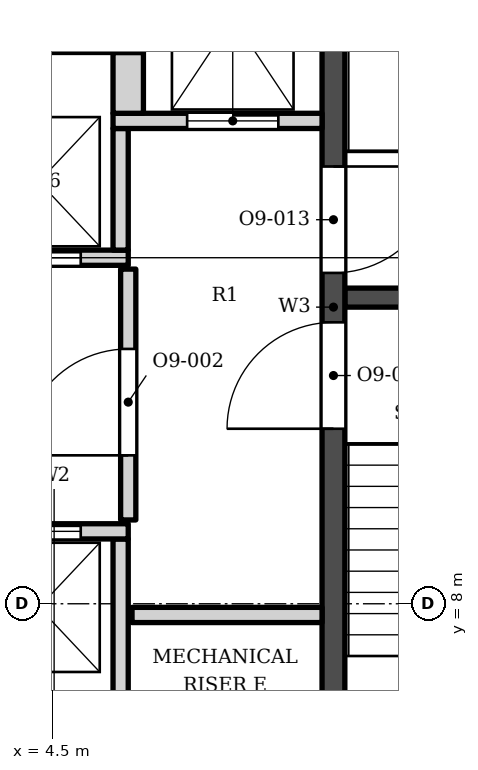
"""IFC4 building model, lengths in metres.
Left out: names, types, materials, properties, quantities, classifications, styles, units other than length and angle.
Written with IfcOpenShell. Run it as: python <this file> out.ifc"""

import sys

from ifc_helpers import new_model, si_unit, direction, frame, frame_2d, origin, place, context, subcontext, project, spatial, rectangle, extrude, element, fill, save


model = new_model("IFC4")
c1 = context("Model", 3, precision=1e-05, world=origin(), true_north=direction((0.0, 1.0)))
c2 = subcontext(c1, "Body", "Model", "MODEL_VIEW")
j1 = project(units=[si_unit("LENGTHUNIT", "METRE"), si_unit("PLANEANGLEUNIT", "RADIAN")], contexts=[c1])
p1 = place(None, origin())
s1 = spatial("IfcSite", under=j1, at=p1, CompositionType="ELEMENT")
p2 = place(p1, origin())
s2 = spatial("IfcBuilding", under=s1, at=p2, CompositionType="ELEMENT")
p3 = place(p2, frame((0.0, 0.0, 248.2)))
s3 = spatial("IfcBuildingStorey", under=s2, at=p3, CompositionType="ELEMENT", Elevation=248.2)
p4 = place(p3, frame((8.2, 5.253, 0.0), z_axis=(0.0, 0.0, 1.0), x_axis=(0.0, 1.0, 0.0)))
e1 = element("IfcWall", 1, at=p4, inside=s3, PredefinedType="SHEAR", context=c2, shape_type="SweptSolid", body=[
    extrude(rectangle(XDim=13.3, YDim=0.3, at=frame_2d((6.65, 0.0))), origin(), (0.0, 0.0, 1.0), 3.9),
])
p5 = place(p4, frame((7.1, 0.0, 0.0)))
e2 = element("IfcOpeningElement", 2, at=p5, cuts=e1, PredefinedType="OPENING", context=c2, shape_type="SweptSolid", body=[
    extrude(rectangle(XDim=1.4, YDim=2.1, at=frame_2d((0.7, 1.05))), frame((0.0, 0.16, 0.0), z_axis=(0.0, -1.0, 0.0), x_axis=(1.0, 0.0, 0.0)), (0.0, 0.0, 1.0), 0.32),
])
p6 = place(p4, frame((5.05, 0.0, 0.0)))
e3 = element("IfcOpeningElement", 3, at=p6, cuts=e1, PredefinedType="OPENING", context=c2, shape_type="SweptSolid", body=[
    extrude(rectangle(XDim=1.4, YDim=2.1, at=frame_2d((0.7, 1.05))), frame((0.0, 0.16, 0.0), z_axis=(0.0, -1.0, 0.0), x_axis=(1.0, 0.0, 0.0)), (0.0, 0.0, 1.0), 0.32),
])
p7 = place(p3, frame((8.35, 12.028, 0.0), z_axis=(0.0, 0.0, 1.0), x_axis=(1.0, 0.0, 0.0)))
e4 = element("IfcWall", 4, at=p7, inside=s3, PredefinedType="SHEAR", context=c2, shape_type="SweptSolid", body=[
    extrude(rectangle(XDim=3.75, YDim=0.25, at=frame_2d((1.875, 0.0))), origin(), (0.0, 0.0, 1.0), 3.9),
])
for number, where, z_axis, x_axis in (
    (5, (5.4, 6.353, 0.0), (0.0, 0.0, 1.0), (0.0, 1.0, 0.0)),
    (6, (5.55, 7.853, 0.0), (0.0, 0.0, 1.0), (1.0, 0.0, 0.0)),
):
    element("IfcWall", number, at=place(p3, frame(where, z_axis=z_axis, x_axis=x_axis)), inside=s3, PredefinedType="SOLIDWALL", context=c2, shape_type="SweptSolid", body=[
        extrude(rectangle(XDim=2.5, YDim=0.2, at=frame_2d((1.25, 0.0))), origin(), (0.0, 0.0, 1.0), 3.73),
    ])
p8 = place(p3, frame((1.0, 8.953, 0.0), z_axis=(0.0, 0.0, 1.0), x_axis=(1.0, 0.0, 0.0)))
e7 = element("IfcWall", 7, at=p8, inside=s3, PredefinedType="SOLIDWALL", context=c2, shape_type="SweptSolid", body=[
    extrude(rectangle(XDim=4.5, YDim=0.2, at=frame_2d((2.25, 0.0))), origin(), (0.0, 0.0, 1.0), 3.73),
])
p9 = place(p8, frame((0.625, 0.0, 0.0)))
e8 = element("IfcOpeningElement", 8, at=p9, cuts=e7, PredefinedType="OPENING", context=c2, shape_type="SweptSolid", body=[
    extrude(rectangle(XDim=1.1, YDim=2.1, at=frame_2d((0.55, 1.05))), frame((0.0, 0.11, 0.0), z_axis=(0.0, -1.0, 0.0), x_axis=(1.0, 0.0, 0.0)), (0.0, 0.0, 1.0), 0.22),
])
p10 = place(p8, frame((2.775, 0.0, 0.0)))
e9 = element("IfcOpeningElement", 9, at=p10, cuts=e7, PredefinedType="OPENING", context=c2, shape_type="SweptSolid", body=[
    extrude(rectangle(XDim=1.1, YDim=2.1, at=frame_2d((0.55, 1.05))), frame((0.0, 0.11, 0.0), z_axis=(0.0, -1.0, 0.0), x_axis=(1.0, 0.0, 0.0)), (0.0, 0.0, 1.0), 0.22),
])
p11 = place(p3, frame((5.5, 9.103, 0.0), z_axis=(0.0, 0.0, 1.0), x_axis=(0.0, 1.0, 0.0)))
e10 = element("IfcWall", 10, at=p11, inside=s3, PredefinedType="SOLIDWALL", context=c2, shape_type="SweptSolid", body=[
    extrude(rectangle(XDim=3.3, YDim=0.2, at=frame_2d((1.65, 0.0))), origin(), (0.0, 0.0, 1.0), 3.73),
])
p12 = place(p11, frame((0.85, 0.0, 0.0)))
e11 = element("IfcOpeningElement", 11, at=p12, cuts=e10, PredefinedType="OPENING", context=c2, shape_type="SweptSolid", body=[
    extrude(rectangle(XDim=1.4, YDim=2.1, at=frame_2d((0.7, 1.05))), frame((0.0, 0.11, 0.0), z_axis=(0.0, -1.0, 0.0), x_axis=(1.0, 0.0, 0.0)), (0.0, 0.0, 1.0), 0.22),
])
p13 = place(p3, frame((-1.5, 12.552, 0.0), z_axis=(0.0, 0.0, 1.0), x_axis=(1.0, 0.0, 0.0)))
e12 = element("IfcWall", 12, at=p13, inside=s3, PredefinedType="SOLIDWALL", context=c2, shape_type="SweptSolid", body=[
    extrude(rectangle(XDim=7.0, YDim=0.2, at=frame_2d((3.5, 0.0))), origin(), (0.0, 0.0, 1.0), 3.73),
])
p14 = place(p13, frame((3.075, 0.0, 0.0)))
e13 = element("IfcOpeningElement", 13, at=p14, cuts=e12, PredefinedType="OPENING", context=c2, shape_type="SweptSolid", body=[
    extrude(rectangle(XDim=1.1, YDim=2.1, at=frame_2d((0.55, 1.05))), frame((0.0, 0.11, 0.0), z_axis=(0.0, -1.0, 0.0), x_axis=(1.0, 0.0, 0.0)), (0.0, 0.0, 1.0), 0.22),
])
p15 = place(p13, frame((5.275, 0.0, 0.0)))
e14 = element("IfcOpeningElement", 14, at=p15, cuts=e12, PredefinedType="OPENING", context=c2, shape_type="SweptSolid", body=[
    extrude(rectangle(XDim=1.1, YDim=2.1, at=frame_2d((0.55, 1.05))), frame((0.0, 0.11, 0.0), z_axis=(0.0, -1.0, 0.0), x_axis=(1.0, 0.0, 0.0)), (0.0, 0.0, 1.0), 0.22),
])
p16 = place(p3, frame((5.4, 12.653, 0.0), z_axis=(0.0, 0.0, 1.0), x_axis=(0.0, 1.0, 0.0)))
e15 = element("IfcWall", 15, at=p16, inside=s3, PredefinedType="SOLIDWALL", context=c2, shape_type="SweptSolid", body=[
    extrude(rectangle(XDim=1.6, YDim=0.2, at=frame_2d((0.8, 0.0))), origin(), (0.0, 0.0, 1.0), 3.73),
])
p17 = place(p3, frame((5.3, 14.353, 0.0), z_axis=(0.0, 0.0, 1.0), x_axis=(1.0, 0.0, 0.0)))
e16 = element("IfcWall", 16, at=p17, inside=s3, PredefinedType="SOLIDWALL", context=c2, shape_type="SweptSolid", body=[
    extrude(rectangle(XDim=2.75, YDim=0.2, at=frame_2d((1.375, 0.0))), origin(), (0.0, 0.0, 1.0), 3.73),
])
p18 = place(p17, frame((0.975, 0.0, 0.0)))
e17 = element("IfcOpeningElement", 17, at=p18, cuts=e16, PredefinedType="OPENING", context=c2, shape_type="SweptSolid", body=[
    extrude(rectangle(XDim=1.2, YDim=2.1, at=frame_2d((0.6, 1.05))), frame((0.0, 0.11, 0.0), z_axis=(0.0, -1.0, 0.0), x_axis=(1.0, 0.0, 0.0)), (0.0, 0.0, 1.0), 0.22),
])
p19 = place(p3, frame((5.5, 14.453, 0.0), z_axis=(0.0, 0.0, 1.0), x_axis=(0.0, 1.0, 0.0)))
e18 = element("IfcWall", 18, at=p19, inside=s3, PredefinedType="SOLIDWALL", context=c2, shape_type="SweptSolid", body=[
    extrude(rectangle(XDim=0.8, YDim=0.4, at=frame_2d((0.4, 0.0))), origin(), (0.0, 0.0, 1.0), 3.73),
])
p20 = place(p3, frame((-1.5, 15.353, 0.0), z_axis=(0.0, 0.0, 1.0), x_axis=(1.0, 0.0, 0.0)))
e19 = element("IfcWall", 19, at=p20, inside=s3, PredefinedType="SOLIDWALL", context=c2, shape_type="SweptSolid", body=[
    extrude(rectangle(XDim=7.2, YDim=0.2, at=frame_2d((3.6, 0.0))), origin(), (0.0, 0.0, 1.0), 3.73),
])
p21 = place(p10, origin())
e20 = element("IfcDoor", 20, at=p21, inside=s3, OperationType="DOUBLE_DOOR_SLIDING", PredefinedType="DOOR", context=c2, shape_type="SweptSolid", body=[
    extrude(rectangle(XDim=1.1, YDim=2.1, at=frame_2d((0.55, 1.05))), frame((0.0, 0.025, 0.0), z_axis=(0.0, -1.0, 0.0), x_axis=(1.0, 0.0, 0.0)), (0.0, 0.0, 1.0), 0.05),
])
fill(e9, e20)
p22 = place(p15, origin())
e21 = element("IfcDoor", 21, at=p22, inside=s3, OperationType="DOUBLE_DOOR_SLIDING", PredefinedType="DOOR", context=c2, shape_type="SweptSolid", body=[
    extrude(rectangle(XDim=1.1, YDim=2.1, at=frame_2d((0.55, 1.05))), frame((0.0, 0.025, 0.0), z_axis=(0.0, -1.0, 0.0), x_axis=(1.0, 0.0, 0.0)), (0.0, 0.0, 1.0), 0.05),
])
fill(e14, e21)
p23 = place(p18, origin())
e22 = element("IfcDoor", 22, at=p23, inside=s3, OperationType="DOUBLE_DOOR_SLIDING", PredefinedType="DOOR", context=c2, shape_type="SweptSolid", body=[
    extrude(rectangle(XDim=1.2, YDim=2.1, at=frame_2d((0.6, 1.05))), frame((0.0, 0.025, 0.0), z_axis=(0.0, -1.0, 0.0), x_axis=(1.0, 0.0, 0.0)), (0.0, 0.0, 1.0), 0.05),
])
fill(e17, e22)
p24 = place(p5, origin())
e23 = element("IfcDoor", 23, at=p24, inside=s3, OperationType="SINGLE_SWING_RIGHT", PredefinedType="DOOR", context=c2, shape_type="SweptSolid", body=[
    extrude(rectangle(XDim=1.4, YDim=2.1, at=frame_2d((0.7, 1.05))), frame((0.0, 0.025, 0.0), z_axis=(0.0, -1.0, 0.0), x_axis=(1.0, 0.0, 0.0)), (0.0, 0.0, 1.0), 0.05),
])
fill(e2, e23)
p25 = place(p6, origin())
e24 = element("IfcDoor", 24, at=p25, inside=s3, OperationType="SINGLE_SWING_LEFT", PredefinedType="DOOR", context=c2, shape_type="SweptSolid", body=[
    extrude(rectangle(XDim=1.4, YDim=2.1, at=frame_2d((0.7, 1.05))), frame((0.0, 0.025, 0.0), z_axis=(0.0, -1.0, 0.0), x_axis=(1.0, 0.0, 0.0)), (0.0, 0.0, 1.0), 0.05),
])
fill(e3, e24)
p26 = place(p12, origin())
e25 = element("IfcDoor", 25, at=p26, inside=s3, OperationType="SINGLE_SWING_LEFT", PredefinedType="DOOR", context=c2, shape_type="SweptSolid", body=[
    extrude(rectangle(XDim=1.4, YDim=2.1, at=frame_2d((0.7, 1.05))), frame((0.0, 0.025, 0.0), z_axis=(0.0, -1.0, 0.0), x_axis=(1.0, 0.0, 0.0)), (0.0, 0.0, 1.0), 0.05),
])
fill(e11, e25)
save(model, sys.argv[1])
